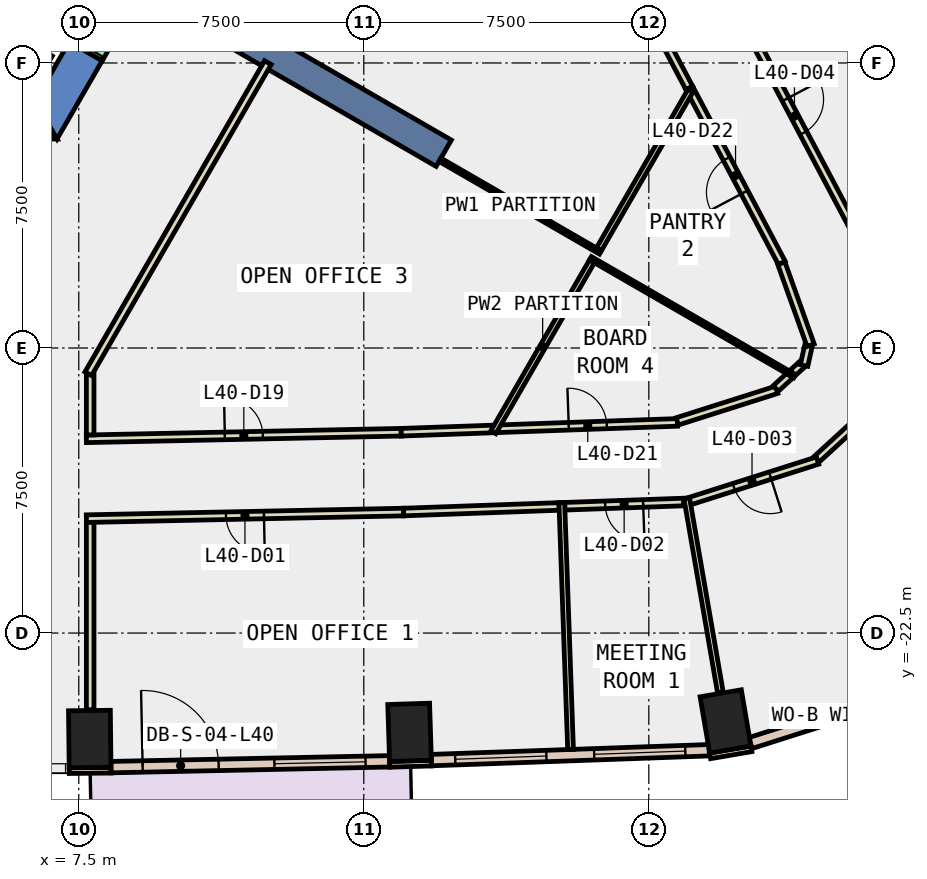
"""IFC4 building model, lengths in metres.
Left out: names, types, materials, properties, quantities, classifications, styles, units other than length and angle.
Written with IfcOpenShell. Run it as: python <this file> out.ifc"""

import sys

from ifc_helpers import new_model, si_unit, direction, frame, frame_2d, origin, origin_2d, place, context, subcontext, project, spatial, polyline, rectangle, outline, extrude, element, fill, save


model = new_model("IFC4")
c1 = context("Model", 3, precision=1e-05, world=origin(), true_north=direction((0.0, 1.0)))
c2 = subcontext(c1, "Body", "Model", "MODEL_VIEW")
j1 = project(units=[si_unit("LENGTHUNIT", "METRE"), si_unit("PLANEANGLEUNIT", "RADIAN")], contexts=[c1])
p1 = place(None, origin())
s1 = spatial("IfcSite", under=j1, at=p1, CompositionType="ELEMENT")
p2 = place(p1, origin())
s2 = spatial("IfcBuilding", under=s1, at=p2, CompositionType="ELEMENT")
p3 = place(p2, frame((0.0, 0.0, 180.2)))
s3 = spatial("IfcBuildingStorey", under=s2, at=p3, CompositionType="ELEMENT", Elevation=180.2)
for number, where, z_axis, x_axis in (
    (1, (7.789, -25.289, -0.4), (0.0, 0.0, 1.0), (1.0, 0.012, 0.0)),
    (2, (16.205, -25.113, -0.4), (0.0, 0.0, 1.0), (0.999, 0.032, 0.0)),
    (3, (24.518, -24.825, -0.4), (0.0, 0.0, 1.0), (0.986, 0.168, 0.0)),
):
    element("IfcColumn", number, at=place(p3, frame(where, z_axis=z_axis, x_axis=x_axis)), inside=s3, PredefinedType="COLUMN", context=c2, shape_type="SweptSolid", body=[
        extrude(rectangle(XDim=1.1, YDim=1.5, at=origin_2d()), origin(), (0.0, 0.0, 1.0), 4.0),
    ])
p4 = place(p3, frame((0.0, 0.0, -0.4)))
e4 = element("IfcWall", 4, at=p4, inside=s3, PredefinedType="SHEAR", context=c2, shape_type="SweptSolid", body=[
    extrude(outline(polyline([(5.75, -8.5), (5.75, -9.5), (6.928, -9.5), (6.351, -8.5), (5.75, -8.5)])), origin(), (0.0, 0.0, 1.0), 4.0),
])
p5 = place(p3, frame((0.0, 0.0, -0.4)))
e5 = element("IfcWall", 5, at=p5, inside=s3, PredefinedType="SHEAR", context=c2, shape_type="SweptSolid", body=[
    extrude(outline(polyline([(8.117, -7.44), (7.252, -6.94), (6.351, -8.5), (6.928, -9.5), (8.117, -7.44)])), origin(), (0.0, 0.0, 1.0), 4.0),
])
p6 = place(p3, frame((9.31, -5.375, -0.4), z_axis=(0.0, 0.0, 1.0), x_axis=(0.866017533419, -0.500013631625, 0.0)))
e6 = element("IfcWall", 6, at=p6, inside=s3, PredefinedType="SHEAR", context=c2, shape_type="SweptSolid", body=[
    extrude(rectangle(XDim=9.0, YDim=0.8, at=frame_2d((4.5, 0.0))), origin(), (0.0, 0.0, 1.0), 4.0),
])
p7 = place(p3, frame((7.249, -26.12, 0.0), z_axis=(0.0, 0.0, 1.0), x_axis=(0.99993844157, 0.011095632951, 0.0)))
e7 = element("IfcWall", 7, at=p7, inside=s3, PredefinedType="STANDARD", context=c2, shape_type="SweptSolid", body=[
    extrude(rectangle(XDim=1.1, YDim=0.15, at=frame_2d((0.55, 0.0))), origin(), (0.0, 0.0, 1.0), 3.6),
])
p8 = place(p3, frame((15.682, -25.955, 0.0), z_axis=(0.0, 0.0, 1.0), x_axis=(0.99951682968, 0.031082264806, 0.0)))
e8 = element("IfcWall", 8, at=p8, inside=s3, PredefinedType="STANDARD", context=c2, shape_type="SweptSolid", body=[
    extrude(rectangle(XDim=1.1, YDim=0.15, at=frame_2d((0.55, 0.0))), origin(), (0.0, 0.0, 1.0), 3.6),
])
p9 = place(p3, frame((24.114, -25.731, 0.0), z_axis=(0.0, 0.0, 1.0), x_axis=(0.985763338892, 0.168138751323, 0.0)))
e9 = element("IfcWall", 9, at=p9, inside=s3, PredefinedType="STANDARD", context=c2, shape_type="SweptSolid", body=[
    extrude(rectangle(XDim=1.101, YDim=0.15, at=frame_2d((0.55, 0.0))), origin(), (0.0, 0.0, 1.0), 3.6),
])
p10 = place(p3, frame((8.347, -26.028, 0.0), z_axis=(0.0, 0.0, 1.0), x_axis=(0.999782189413, 0.020870403275, 0.0)))
e10 = element("IfcWall", 10, at=p10, inside=s3, PredefinedType="STANDARD", context=c2, shape_type="SweptSolid", body=[
    extrude(rectangle(XDim=7.335, YDim=0.3, at=frame_2d((3.667, 0.0))), origin(), (0.0, 0.0, 1.0), 3.6),
])
p11 = place(p10, frame((0.834, 0.0, 0.0)))
e11 = element("IfcOpeningElement", 11, at=p11, cuts=e10, PredefinedType="OPENING", context=c2, shape_type="SweptSolid", body=[
    extrude(rectangle(XDim=2.0, YDim=2.4, at=frame_2d((1.0, 1.2))), frame((0.0, 0.16, 0.0), z_axis=(0.0, -1.0, 0.0), x_axis=(1.0, 0.0, 0.0)), (0.0, 0.0, 1.0), 0.32),
])
p12 = place(p10, frame((4.301, 0.0, 0.9)))
e12 = element("IfcOpeningElement", 12, at=p12, cuts=e10, PredefinedType="OPENING", context=c2, shape_type="SweptSolid", body=[
    extrude(rectangle(XDim=2.4, YDim=2.6, at=frame_2d((1.2, 1.3))), frame((0.0, 0.16, 0.0), z_axis=(0.0, -1.0, 0.0), x_axis=(1.0, 0.0, 0.0)), (0.0, 0.0, 1.0), 0.32),
])
p13 = place(p3, frame((16.778, -25.843, 0.0), z_axis=(0.0, 0.0, 1.0), x_axis=(0.999368368263, 0.035536805082, 0.0)))
e13 = element("IfcWall", 13, at=p13, inside=s3, PredefinedType="STANDARD", context=c2, shape_type="SweptSolid", body=[
    extrude(rectangle(XDim=7.317, YDim=0.3, at=frame_2d((3.658, 0.0))), origin(), (0.0, 0.0, 1.0), 3.6),
])
p14 = place(p13, frame((0.629, 0.0, 0.9)))
e14 = element("IfcOpeningElement", 14, at=p14, cuts=e13, PredefinedType="OPENING", context=c2, shape_type="SweptSolid", body=[
    extrude(rectangle(XDim=2.4, YDim=2.6, at=frame_2d((1.2, 1.3))), frame((0.0, 0.16, 0.0), z_axis=(0.0, -1.0, 0.0), x_axis=(1.0, 0.0, 0.0)), (0.0, 0.0, 1.0), 0.32),
])
p15 = place(p13, frame((4.287, 0.0, 0.9)))
e15 = element("IfcOpeningElement", 15, at=p15, cuts=e13, PredefinedType="OPENING", context=c2, shape_type="SweptSolid", body=[
    extrude(rectangle(XDim=2.4, YDim=2.6, at=frame_2d((1.2, 1.3))), frame((0.0, 0.16, 0.0), z_axis=(0.0, -1.0, 0.0), x_axis=(1.0, 0.0, 0.0)), (0.0, 0.0, 1.0), 0.32),
])
p16 = place(p3, frame((25.172, -25.395, 0.0), z_axis=(0.0, 0.0, 1.0), x_axis=(0.953145379857, 0.302512619337, 0.0)))
e16 = element("IfcWall", 16, at=p16, inside=s3, PredefinedType="STANDARD", context=c2, shape_type="SweptSolid", body=[
    extrude(rectangle(XDim=4.711, YDim=0.3, at=frame_2d((2.355, 0.0))), origin(), (0.0, 0.0, 1.0), 3.6),
])
p17 = place(p16, frame((1.655, 0.0, 0.9)))
e17 = element("IfcOpeningElement", 17, at=p17, cuts=e16, PredefinedType="OPENING", context=c2, shape_type="SweptSolid", body=[
    extrude(rectangle(XDim=1.4, YDim=2.6, at=frame_2d((0.7, 1.3))), frame((0.0, 0.16, 0.0), z_axis=(0.0, -1.0, 0.0), x_axis=(1.0, 0.0, 0.0)), (0.0, 0.0, 1.0), 0.32),
])
p18 = place(p3, frame((7.7, -17.389, 0.0), z_axis=(0.0, 0.0, 1.0), x_axis=(0.999782442794, 0.020858261713, 0.0)))
e18 = element("IfcWall", 18, at=p18, inside=s3, PredefinedType="PARTITIONING", context=c2, shape_type="SweptSolid", body=[
    extrude(rectangle(XDim=8.287, YDim=0.2, at=frame_2d((4.144, 0.0))), origin(), (0.0, 0.0, 1.0), 3.6),
])
p19 = place(p18, frame((3.644, 0.0, 0.0)))
e19 = element("IfcOpeningElement", 19, at=p19, cuts=e18, PredefinedType="OPENING", context=c2, shape_type="SweptSolid", body=[
    extrude(rectangle(XDim=1.0, YDim=2.1, at=frame_2d((0.5, 1.05))), frame((0.0, 0.11, 0.0), z_axis=(0.0, -1.0, 0.0), x_axis=(1.0, 0.0, 0.0)), (0.0, 0.0, 1.0), 0.22),
])
p20 = place(p3, frame((15.985, -17.216, 0.0), z_axis=(0.0, 0.0, 1.0), x_axis=(0.999373434249, 0.035394052017, 0.0)))
e20 = element("IfcWall", 20, at=p20, inside=s3, PredefinedType="PARTITIONING", context=c2, shape_type="SweptSolid", body=[
    extrude(rectangle(XDim=2.4, YDim=0.2, at=frame_2d((1.2, 0.0))), origin(), (0.0, 0.0, 1.0), 3.6),
])
p21 = place(p3, frame((23.565, -8.158, 0.0), z_axis=(0.0, 0.0, 1.0), x_axis=(-0.46753134131, 0.883976495668, 0.0)))
e21 = element("IfcWall", 21, at=p21, inside=s3, PredefinedType="PARTITIONING", context=c2, shape_type="SweptSolid", body=[
    extrude(rectangle(XDim=1.448, YDim=0.2, at=frame_2d((0.724, 0.0))), origin(), (0.0, 0.0, 1.0), 3.6),
])
p22 = place(p3, frame((18.534, -17.125, 0.0), z_axis=(0.0, 0.0, 1.0), x_axis=(0.999367128298, 0.035571658351, 0.0)))
e22 = element("IfcWall", 22, at=p22, inside=s3, PredefinedType="PARTITIONING", context=c2, shape_type="SweptSolid", body=[
    extrude(rectangle(XDim=4.722, YDim=0.2, at=frame_2d((2.361, 0.0))), origin(), (0.0, 0.0, 1.0), 3.6),
])
p23 = place(p22, frame((1.861, 0.0, 0.0)))
e23 = element("IfcOpeningElement", 23, at=p23, cuts=e22, PredefinedType="OPENING", context=c2, shape_type="SweptSolid", body=[
    extrude(rectangle(XDim=1.0, YDim=2.1, at=frame_2d((0.5, 1.05))), frame((0.0, 0.11, 0.0), z_axis=(0.0, -1.0, 0.0), x_axis=(1.0, 0.0, 0.0)), (0.0, 0.0, 1.0), 0.22),
])
p24 = place(p3, frame((23.249, -16.93, 0.0), z_axis=(0.0, 0.0, 1.0), x_axis=(0.953158072423, 0.302472625167, 0.0)))
e24 = element("IfcWall", 24, at=p24, inside=s3, PredefinedType="PARTITIONING", context=c2, shape_type="SweptSolid", body=[
    extrude(rectangle(XDim=2.743, YDim=0.2, at=frame_2d((1.372, 0.0))), origin(), (0.0, 0.0, 1.0), 3.6),
])
p25 = place(p3, frame((25.842, -16.063, 0.0), z_axis=(0.0, 0.0, 1.0), x_axis=(0.738222400631, 0.674557400972, 0.0)))
e25 = element("IfcWall", 25, at=p25, inside=s3, PredefinedType="PARTITIONING", context=c2, shape_type="SweptSolid", body=[
    extrude(rectangle(XDim=0.502, YDim=0.2, at=frame_2d((0.251, 0.0))), origin(), (0.0, 0.0, 1.0), 3.6),
])
p26 = place(p3, frame((26.286, -15.656, 0.0), z_axis=(0.0, 0.0, 1.0), x_axis=(0.73763613927, 0.675198434568, 0.0)))
e26 = element("IfcWall", 26, at=p26, inside=s3, PredefinedType="PARTITIONING", context=c2, shape_type="SweptSolid", body=[
    extrude(rectangle(XDim=0.336, YDim=0.2, at=frame_2d((0.168, 0.0))), origin(), (0.0, 0.0, 1.0), 3.6),
])
p27 = place(p3, frame((26.586, -15.459, 0.0), z_axis=(0.0, 0.0, 1.0), x_axis=(0.215832999607, 0.976430292586, 0.0)))
e27 = element("IfcWall", 27, at=p27, inside=s3, PredefinedType="PARTITIONING", context=c2, shape_type="SweptSolid", body=[
    extrude(rectangle(XDim=0.542, YDim=0.2, at=frame_2d((0.271, 0.0))), origin(), (0.0, 0.0, 1.0), 3.6),
])
p28 = place(p3, frame((26.758, -14.926, 0.0), z_axis=(0.0, 0.0, 1.0), x_axis=(-0.33645112914, 0.941700927949, 0.0)))
e28 = element("IfcWall", 28, at=p28, inside=s3, PredefinedType="PARTITIONING", context=c2, shape_type="SweptSolid", body=[
    extrude(rectangle(XDim=2.292, YDim=0.2, at=frame_2d((1.146, 0.0))), origin(), (0.0, 0.0, 1.0), 3.6),
])
p29 = place(p3, frame((26.0, -12.762, 0.0), z_axis=(0.0, 0.0, 1.0), x_axis=(-0.467534471159, 0.883974840297, 0.0)))
e29 = element("IfcWall", 29, at=p29, inside=s3, PredefinedType="PARTITIONING", context=c2, shape_type="SweptSolid", body=[
    extrude(rectangle(XDim=5.208, YDim=0.2, at=frame_2d((2.604, 0.0))), origin(), (0.0, 0.0, 1.0), 3.6),
])
p30 = place(p29, frame((2.104, 0.0, 0.0)))
e30 = element("IfcOpeningElement", 30, at=p30, cuts=e29, PredefinedType="OPENING", context=c2, shape_type="SweptSolid", body=[
    extrude(rectangle(XDim=1.0, YDim=2.1, at=frame_2d((0.5, 1.05))), frame((0.0, 0.11, 0.0), z_axis=(0.0, -1.0, 0.0), x_axis=(1.0, 0.0, 0.0)), (0.0, 0.0, 1.0), 0.22),
])
p31 = place(p3, frame((20.138, -19.169, 0.0), z_axis=(0.0, 0.0, 1.0), x_axis=(-0.999355925453, -0.035885014442, 0.0)))
e31 = element("IfcWall", 31, at=p31, inside=s3, PredefinedType="PARTITIONING", context=c2, shape_type="SweptSolid", body=[
    extrude(rectangle(XDim=4.096, YDim=0.2, at=frame_2d((2.048, 0.0))), origin(), (0.0, 0.0, 1.0), 3.6),
])
p32 = place(p3, frame((16.045, -19.316, 0.0), z_axis=(0.0, 0.0, 1.0), x_axis=(-0.99978251073, -0.020855005124, 0.0)))
e32 = element("IfcWall", 32, at=p32, inside=s3, PredefinedType="PARTITIONING", context=c2, shape_type="SweptSolid", body=[
    extrude(rectangle(XDim=8.347, YDim=0.2, at=frame_2d((4.173, 0.0))), origin(), (0.0, 0.0, 1.0), 3.6),
])
p33 = place(p32, frame((3.673, 0.0, 0.0)))
e33 = element("IfcOpeningElement", 33, at=p33, cuts=e32, PredefinedType="OPENING", context=c2, shape_type="SweptSolid", body=[
    extrude(rectangle(XDim=1.0, YDim=2.1, at=frame_2d((0.5, 1.05))), frame((0.0, 0.11, 0.0), z_axis=(0.0, -1.0, 0.0), x_axis=(1.0, 0.0, 0.0)), (0.0, 0.0, 1.0), 0.22),
])
p34 = place(p3, frame((23.415, -19.052, 0.0), z_axis=(0.0, 0.0, 1.0), x_axis=(-0.999358473407, -0.035813986516, 0.0)))
e34 = element("IfcWall", 34, at=p34, inside=s3, PredefinedType="PARTITIONING", context=c2, shape_type="SweptSolid", body=[
    extrude(rectangle(XDim=3.129, YDim=0.2, at=frame_2d((1.564, 0.0))), origin(), (0.0, 0.0, 1.0), 3.6),
])
p35 = place(p34, frame((1.065, 0.0, 0.0)))
e35 = element("IfcOpeningElement", 35, at=p35, cuts=e34, PredefinedType="OPENING", context=c2, shape_type="SweptSolid", body=[
    extrude(rectangle(XDim=1.0, YDim=2.1, at=frame_2d((0.5, 1.05))), frame((0.0, 0.11, 0.0), z_axis=(0.0, -1.0, 0.0), x_axis=(1.0, 0.0, 0.0)), (0.0, 0.0, 1.0), 0.22),
])
p36 = place(p3, frame((28.588, -16.395, 0.0), z_axis=(0.0, 0.0, 1.0), x_axis=(-0.737118331834, -0.675763690112, 0.0)))
e36 = element("IfcWall", 36, at=p36, inside=s3, PredefinedType="PARTITIONING", context=c2, shape_type="SweptSolid", body=[
    extrude(rectangle(XDim=2.264, YDim=0.2, at=frame_2d((1.132, 0.0))), origin(), (0.0, 0.0, 1.0), 3.6),
])
p37 = place(p3, frame((26.94, -17.962, 0.0), z_axis=(0.0, 0.0, 1.0), x_axis=(-0.953197442309, -0.302348533941, 0.0)))
e37 = element("IfcWall", 37, at=p37, inside=s3, PredefinedType="PARTITIONING", context=c2, shape_type="SweptSolid", body=[
    extrude(rectangle(XDim=3.618, YDim=0.2, at=frame_2d((1.809, 0.0))), origin(), (0.0, 0.0, 1.0), 3.6),
])
p38 = place(p37, frame((1.309, 0.0, 0.0)))
e38 = element("IfcOpeningElement", 38, at=p38, cuts=e37, PredefinedType="OPENING", context=c2, shape_type="SweptSolid", body=[
    extrude(rectangle(XDim=1.0, YDim=2.1, at=frame_2d((0.5, 1.05))), frame((0.0, 0.11, 0.0), z_axis=(0.0, -1.0, 0.0), x_axis=(1.0, 0.0, 0.0)), (0.0, 0.0, 1.0), 0.22),
])
p39 = place(p3, frame((24.738, -5.885, 0.0), z_axis=(0.0, 0.0, 1.0), x_axis=(0.467616297571, -0.883931557444, 0.0)))
e39 = element("IfcWall", 39, at=p39, inside=s3, PredefinedType="PARTITIONING", context=c2, shape_type="SweptSolid", body=[
    extrude(rectangle(XDim=6.82, YDim=0.2, at=frame_2d((3.41, 0.0))), origin(), (0.0, 0.0, 1.0), 3.6),
])
p40 = place(p39, frame((2.91, 0.0, 0.0)))
e40 = element("IfcOpeningElement", 40, at=p40, cuts=e39, PredefinedType="OPENING", context=c2, shape_type="SweptSolid", body=[
    extrude(rectangle(XDim=1.0, YDim=2.1, at=frame_2d((0.5, 1.05))), frame((0.0, 0.11, 0.0), z_axis=(0.0, -1.0, 0.0), x_axis=(1.0, 0.0, 0.0)), (0.0, 0.0, 1.0), 0.22),
])
p41 = place(p3, frame((7.8, -15.69, 0.0), z_axis=(0.0, 0.0, 1.0), x_axis=(0.0, -1.0, 0.0)))
e41 = element("IfcWall", 41, at=p41, inside=s3, PredefinedType="PARTITIONING", context=c2, shape_type="SweptSolid", body=[
    extrude(rectangle(XDim=1.597, YDim=0.2, at=frame_2d((0.799, 0.0))), origin(), (0.0, 0.0, 1.0), 3.6),
])
p42 = place(p3, frame((7.8, -19.588, 0.0), z_axis=(0.0, 0.0, 1.0), x_axis=(0.0, -1.0, 0.0)))
e42 = element("IfcWall", 42, at=p42, inside=s3, PredefinedType="PARTITIONING", context=c2, shape_type="SweptSolid", body=[
    extrude(rectangle(XDim=4.931, YDim=0.2, at=frame_2d((2.466, 0.0))), origin(), (0.0, 0.0, 1.0), 3.6),
])
p43 = place(p3, frame((12.476, -7.491, 0.0), z_axis=(0.0, 0.0, 1.0), x_axis=(-0.499989258007, -0.866031605588, 0.0)))
e43 = element("IfcWall", 43, at=p43, inside=s3, PredefinedType="PARTITIONING", context=c2, shape_type="SweptSolid", body=[
    extrude(rectangle(XDim=9.452, YDim=0.2, at=frame_2d((4.726, 0.0))), origin(), (0.0, 0.0, 1.0), 3.6),
])
p44 = place(p3, frame((17.004, -10.047, 0.0), z_axis=(0.0, 0.0, 1.0), x_axis=(0.865997117979, -0.500048989253, 0.0)))
e44 = element("IfcWall", 44, at=p44, inside=s3, PredefinedType="PARTITIONING", context=c2, shape_type="SweptSolid", body=[
    extrude(rectangle(XDim=4.875, YDim=0.1, at=frame_2d((2.438, 0.0))), origin(), (0.0, 0.0, 1.0), 3.6),
])
p45 = place(p3, frame((21.004, -12.719, 0.0), z_axis=(0.0, 0.0, 1.0), x_axis=(-0.499877157623, -0.866096315249, 0.0)))
e45 = element("IfcWall", 45, at=p45, inside=s3, PredefinedType="PARTITIONING", context=c2, shape_type="SweptSolid", body=[
    extrude(rectangle(XDim=5.191, YDim=0.15, at=frame_2d((2.596, 0.0))), origin(), (0.0, 0.0, 1.0), 3.6),
])
p46 = place(p3, frame((23.6, -8.224, 0.0), z_axis=(0.0, 0.0, 1.0), x_axis=(-0.500120854176, -0.865955617349, 0.0)))
e46 = element("IfcWall", 46, at=p46, inside=s3, PredefinedType="PARTITIONING", context=c2, shape_type="SweptSolid", body=[
    extrude(rectangle(XDim=4.827, YDim=0.15, at=frame_2d((2.414, 0.0))), origin(), (0.0, 0.0, 1.0), 3.6),
])
p47 = place(p3, frame((20.964, -12.638, 0.0), z_axis=(0.0, 0.0, 1.0), x_axis=(0.865981737723, -0.500075624211, 0.0)))
e47 = element("IfcWall", 47, at=p47, inside=s3, PredefinedType="PARTITIONING", context=c2, shape_type="SweptSolid", body=[
    extrude(rectangle(XDim=6.203, YDim=0.1, at=frame_2d((3.102, 0.0))), origin(), (0.0, 0.0, 1.0), 3.6),
])
p48 = place(p3, frame((20.21, -19.067, 0.0), z_axis=(0.0, 0.0, 1.0), x_axis=(0.035530768169, -0.999368582913, 0.0)))
e48 = element("IfcWall", 48, at=p48, inside=s3, PredefinedType="PARTITIONING", context=c2, shape_type="SweptSolid", body=[
    extrude(rectangle(XDim=6.5, YDim=0.15, at=frame_2d((3.25, 0.0))), origin(), (0.0, 0.0, 1.0), 3.6),
])
p49 = place(p3, frame((23.498, -18.95, 0.0), z_axis=(0.0, 0.0, 1.0), x_axis=(0.170609023531, -0.985338805229, 0.0)))
e49 = element("IfcWall", 49, at=p49, inside=s3, PredefinedType="PARTITIONING", context=c2, shape_type="SweptSolid", body=[
    extrude(rectangle(XDim=5.193, YDim=0.15, at=frame_2d((2.597, 0.0))), origin(), (0.0, 0.0, 1.0), 3.6),
])
p50 = place(p3, frame((4.588, -6.153, 0.0), z_axis=(0.0, 0.0, 1.0), x_axis=(0.866022959057, -0.500004234368, 0.0)))
e50 = element("IfcWall", 50, at=p50, inside=s3, PredefinedType="STANDARD", context=c2, shape_type="SweptSolid", body=[
    extrude(rectangle(XDim=2.5, YDim=0.2, at=frame_2d((1.25, 0.0))), origin(), (0.0, 0.0, 1.0), 3.6),
])
p51 = place(p3, frame((7.598, -7.14, 0.0), z_axis=(0.0, 0.0, 1.0), x_axis=(0.500362116554, 0.865816234728, 0.0)))
e51 = element("IfcWall", 51, at=p51, inside=s3, PredefinedType="STANDARD", context=c2, shape_type="SweptSolid", body=[
    extrude(rectangle(XDim=1.299, YDim=1.2, at=frame_2d((0.65, 0.0))), origin(), (0.0, 0.0, 1.0), 2.4),
])
p52 = place(p51, frame((0.1, 0.0, 0.0)))
e52 = element("IfcOpeningElement", 52, at=p52, cuts=e51, PredefinedType="OPENING", context=c2, shape_type="SweptSolid", body=[
    extrude(rectangle(XDim=1.1, YDim=2.3, at=frame_2d((0.55, 1.15))), frame((0.0, 0.61, 0.0), z_axis=(0.0, -1.0, 0.0), x_axis=(1.0, 0.0, 0.0)), (0.0, 0.0, 1.0), 1.22),
])
p53 = place(p11, origin())
e53 = element("IfcDoor", 53, at=p53, inside=s3, OperationType="SLIDING_TO_LEFT", PredefinedType="DOOR", context=c2, shape_type="SweptSolid", body=[
    extrude(rectangle(XDim=2.0, YDim=2.4, at=frame_2d((1.0, 1.2))), frame((0.0, 0.025, 0.0), z_axis=(0.0, -1.0, 0.0), x_axis=(1.0, 0.0, 0.0)), (0.0, 0.0, 1.0), 0.05),
])
fill(e11, e53)
p54 = place(p12, origin())
e54 = element("IfcWindow", 54, at=p54, inside=s3, PartitioningType="SINGLE_PANEL", PredefinedType="WINDOW", context=c2, shape_type="SweptSolid", body=[
    extrude(rectangle(XDim=2.4, YDim=2.6, at=frame_2d((1.2, 1.3))), frame((0.0, 0.03, 0.0), z_axis=(0.0, -1.0, 0.0), x_axis=(1.0, 0.0, 0.0)), (0.0, 0.0, 1.0), 0.06),
])
fill(e12, e54)
p55 = place(p14, origin())
e55 = element("IfcWindow", 55, at=p55, inside=s3, PartitioningType="SINGLE_PANEL", PredefinedType="WINDOW", context=c2, shape_type="SweptSolid", body=[
    extrude(rectangle(XDim=2.4, YDim=2.6, at=frame_2d((1.2, 1.3))), frame((0.0, 0.03, 0.0), z_axis=(0.0, -1.0, 0.0), x_axis=(1.0, 0.0, 0.0)), (0.0, 0.0, 1.0), 0.06),
])
fill(e14, e55)
p56 = place(p15, origin())
e56 = element("IfcWindow", 56, at=p56, inside=s3, PartitioningType="SINGLE_PANEL", PredefinedType="WINDOW", context=c2, shape_type="SweptSolid", body=[
    extrude(rectangle(XDim=2.4, YDim=2.6, at=frame_2d((1.2, 1.3))), frame((0.0, 0.03, 0.0), z_axis=(0.0, -1.0, 0.0), x_axis=(1.0, 0.0, 0.0)), (0.0, 0.0, 1.0), 0.06),
])
fill(e15, e56)
p57 = place(p17, origin())
e57 = element("IfcWindow", 57, at=p57, inside=s3, PartitioningType="SINGLE_PANEL", PredefinedType="WINDOW", context=c2, shape_type="SweptSolid", body=[
    extrude(rectangle(XDim=1.4, YDim=2.6, at=frame_2d((0.7, 1.3))), frame((0.0, 0.03, 0.0), z_axis=(0.0, -1.0, 0.0), x_axis=(1.0, 0.0, 0.0)), (0.0, 0.0, 1.0), 0.06),
])
fill(e17, e57)
p58 = place(p33, origin())
e58 = element("IfcDoor", 58, at=p58, inside=s3, OperationType="SINGLE_SWING_RIGHT", PredefinedType="DOOR", context=c2, shape_type="SweptSolid", body=[
    extrude(rectangle(XDim=1.0, YDim=2.1, at=frame_2d((0.5, 1.05))), frame((0.0, 0.025, 0.0), z_axis=(0.0, -1.0, 0.0), x_axis=(1.0, 0.0, 0.0)), (0.0, 0.0, 1.0), 0.05),
])
fill(e33, e58)
p59 = place(p35, origin())
e59 = element("IfcDoor", 59, at=p59, inside=s3, OperationType="SINGLE_SWING_LEFT", PredefinedType="DOOR", context=c2, shape_type="SweptSolid", body=[
    extrude(rectangle(XDim=1.0, YDim=2.1, at=frame_2d((0.5, 1.05))), frame((0.0, 0.025, 0.0), z_axis=(0.0, -1.0, 0.0), x_axis=(1.0, 0.0, 0.0)), (0.0, 0.0, 1.0), 0.05),
])
fill(e35, e59)
p60 = place(p38, origin())
e60 = element("IfcDoor", 60, at=p60, inside=s3, OperationType="SINGLE_SWING_LEFT", PredefinedType="DOOR", context=c2, shape_type="SweptSolid", body=[
    extrude(rectangle(XDim=1.0, YDim=2.1, at=frame_2d((0.5, 1.05))), frame((0.0, 0.025, 0.0), z_axis=(0.0, -1.0, 0.0), x_axis=(1.0, 0.0, 0.0)), (0.0, 0.0, 1.0), 0.05),
])
fill(e38, e60)
p61 = place(p40, origin())
e61 = element("IfcDoor", 61, at=p61, inside=s3, OperationType="SINGLE_SWING_LEFT", PredefinedType="DOOR", context=c2, shape_type="SweptSolid", body=[
    extrude(rectangle(XDim=1.0, YDim=2.1, at=frame_2d((0.5, 1.05))), frame((0.0, 0.025, 0.0), z_axis=(0.0, -1.0, 0.0), x_axis=(1.0, 0.0, 0.0)), (0.0, 0.0, 1.0), 0.05),
])
fill(e40, e61)
p62 = place(p19, origin())
e62 = element("IfcDoor", 62, at=p62, inside=s3, OperationType="SINGLE_SWING_RIGHT", PredefinedType="DOOR", context=c2, shape_type="SweptSolid", body=[
    extrude(rectangle(XDim=1.0, YDim=2.1, at=frame_2d((0.5, 1.05))), frame((0.0, 0.025, 0.0), z_axis=(0.0, -1.0, 0.0), x_axis=(1.0, 0.0, 0.0)), (0.0, 0.0, 1.0), 0.05),
])
fill(e19, e62)
p63 = place(p23, origin())
e63 = element("IfcDoor", 63, at=p63, inside=s3, OperationType="SINGLE_SWING_LEFT", PredefinedType="DOOR", context=c2, shape_type="SweptSolid", body=[
    extrude(rectangle(XDim=1.0, YDim=2.1, at=frame_2d((0.5, 1.05))), frame((0.0, 0.025, 0.0), z_axis=(0.0, -1.0, 0.0), x_axis=(1.0, 0.0, 0.0)), (0.0, 0.0, 1.0), 0.05),
])
fill(e23, e63)
p64 = place(p30, origin())
e64 = element("IfcDoor", 64, at=p64, inside=s3, OperationType="SINGLE_SWING_LEFT", PredefinedType="DOOR", context=c2, shape_type="SweptSolid", body=[
    extrude(rectangle(XDim=1.0, YDim=2.1, at=frame_2d((0.5, 1.05))), frame((0.0, 0.025, 0.0), z_axis=(0.0, -1.0, 0.0), x_axis=(1.0, 0.0, 0.0)), (0.0, 0.0, 1.0), 0.05),
])
fill(e30, e64)
save(model, sys.argv[1])
